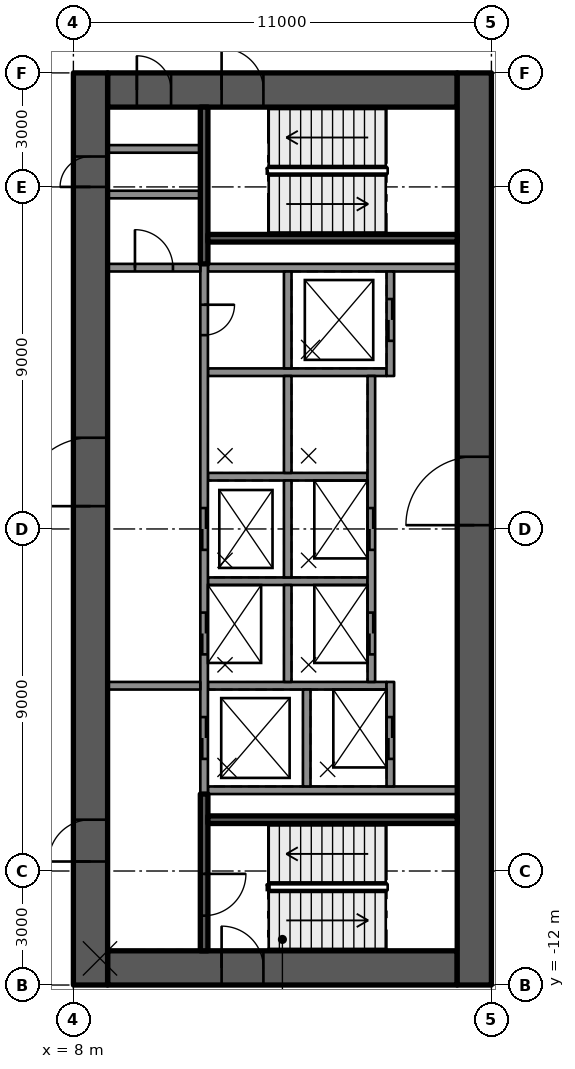
"""IFC4 building model, lengths in metres.
Left out: names, types, materials, properties, quantities, classifications, styles, units other than length and angle.
Written with IfcOpenShell. Run it as: python <this file> out.ifc"""

import sys

from ifc_helpers import new_model, si_unit, direction, frame, frame_2d, origin, place, context, subcontext, project, spatial, rectangle, extrude, element, fill, save


model = new_model("IFC4")
c1 = context("Model", 3, precision=1e-05, world=origin(), true_north=direction((0.0, 1.0)))
c2 = subcontext(c1, "Body", "Model", "MODEL_VIEW")
j1 = project(units=[si_unit("LENGTHUNIT", "METRE"), si_unit("PLANEANGLEUNIT", "RADIAN")], contexts=[c1])
p1 = place(None, origin())
s1 = spatial("IfcSite", under=j1, at=p1, CompositionType="ELEMENT")
p2 = place(p1, origin())
s2 = spatial("IfcBuilding", under=s1, at=p2, CompositionType="ELEMENT")
p3 = place(p2, frame((0.0, 0.0, 98.2)))
s3 = spatial("IfcBuildingStorey", under=s2, at=p3, CompositionType="ELEMENT", Elevation=98.2)
p4 = place(p3, frame((8.9, 11.55, 0.0), z_axis=(0.0, 0.0, 1.0), x_axis=(1.0, 0.0, 0.0)))
e1 = element("IfcWall", 1, at=p4, inside=s3, PredefinedType="SHEAR", context=c2, shape_type="SweptSolid", body=[
    extrude(rectangle(XDim=9.2, YDim=0.9, at=frame_2d((4.6, 0.0))), origin(), (0.0, 0.0, 1.0), 4.0),
])
p5 = place(p4, frame((3.0, 0.0, 0.0)))
e2 = element("IfcOpeningElement", 2, at=p5, cuts=e1, PredefinedType="OPENING", context=c2, shape_type="SweptSolid", body=[
    extrude(rectangle(XDim=1.1, YDim=2.1, at=frame_2d((0.55, 1.05))), frame((0.0, 0.46, 0.0), z_axis=(0.0, -1.0, 0.0), x_axis=(1.0, 0.0, 0.0)), (0.0, 0.0, 1.0), 0.92),
])
p6 = place(p4, frame((0.77, 0.0, 0.0)))
e3 = element("IfcOpeningElement", 3, at=p6, cuts=e1, PredefinedType="OPENING", context=c2, shape_type="SweptSolid", body=[
    extrude(rectangle(XDim=0.9, YDim=2.1, at=frame_2d((0.45, 1.05))), frame((0.0, 0.46, 0.0), z_axis=(0.0, -1.0, 0.0), x_axis=(1.0, 0.0, 0.0)), (0.0, 0.0, 1.0), 0.92),
])
p7 = place(p3, frame((8.9, -11.55, 0.0), z_axis=(0.0, 0.0, 1.0), x_axis=(1.0, 0.0, 0.0)))
e4 = element("IfcWall", 4, at=p7, inside=s3, PredefinedType="SHEAR", context=c2, shape_type="SweptSolid", body=[
    extrude(rectangle(XDim=9.2, YDim=0.9, at=frame_2d((4.6, 0.0))), origin(), (0.0, 0.0, 1.0), 4.0),
])
p8 = place(p7, frame((3.0, 0.0, 0.0)))
e5 = element("IfcOpeningElement", 5, at=p8, cuts=e4, PredefinedType="OPENING", context=c2, shape_type="SweptSolid", body=[
    extrude(rectangle(XDim=1.1, YDim=2.1, at=frame_2d((0.55, 1.05))), frame((0.0, 0.46, 0.0), z_axis=(0.0, -1.0, 0.0), x_axis=(1.0, 0.0, 0.0)), (0.0, 0.0, 1.0), 0.92),
])
p9 = place(p3, frame((8.45, -12.0, 0.0), z_axis=(0.0, 0.0, 1.0), x_axis=(0.0, 1.0, 0.0)))
e6 = element("IfcWall", 6, at=p9, inside=s3, PredefinedType="SHEAR", context=c2, shape_type="SweptSolid", body=[
    extrude(rectangle(XDim=24.0, YDim=0.9, at=frame_2d((12.0, 0.0))), origin(), (0.0, 0.0, 1.0), 4.0),
])
p10 = place(p9, frame((12.6, 0.0, 0.0)))
e7 = element("IfcOpeningElement", 7, at=p10, cuts=e6, PredefinedType="OPENING", context=c2, shape_type="SweptSolid", body=[
    extrude(rectangle(XDim=1.8, YDim=2.1, at=frame_2d((0.9, 1.05))), frame((0.0, 0.46, 0.0), z_axis=(0.0, -1.0, 0.0), x_axis=(1.0, 0.0, 0.0)), (0.0, 0.0, 1.0), 0.92),
])
p11 = place(p9, frame((3.25, 0.0, 0.0)))
e8 = element("IfcOpeningElement", 8, at=p11, cuts=e6, PredefinedType="OPENING", context=c2, shape_type="SweptSolid", body=[
    extrude(rectangle(XDim=1.1, YDim=2.1, at=frame_2d((0.55, 1.05))), frame((0.0, 0.46, 0.0), z_axis=(0.0, -1.0, 0.0), x_axis=(1.0, 0.0, 0.0)), (0.0, 0.0, 1.0), 0.92),
])
p12 = place(p9, frame((21.0, 0.0, 0.0)))
e9 = element("IfcOpeningElement", 9, at=p12, cuts=e6, PredefinedType="OPENING", context=c2, shape_type="SweptSolid", body=[
    extrude(rectangle(XDim=0.8, YDim=2.1, at=frame_2d((0.4, 1.05))), frame((0.0, 0.46, 0.0), z_axis=(0.0, -1.0, 0.0), x_axis=(1.0, 0.0, 0.0)), (0.0, 0.0, 1.0), 0.92),
])
p13 = place(p3, frame((18.55, -12.0, 0.0), z_axis=(0.0, 0.0, 1.0), x_axis=(0.0, 1.0, 0.0)))
e10 = element("IfcWall", 10, at=p13, inside=s3, PredefinedType="SHEAR", context=c2, shape_type="SweptSolid", body=[
    extrude(rectangle(XDim=24.0, YDim=0.9, at=frame_2d((12.0, 0.0))), origin(), (0.0, 0.0, 1.0), 4.0),
])
p14 = place(p13, frame((12.1, 0.0, 0.0)))
e11 = element("IfcOpeningElement", 11, at=p14, cuts=e10, PredefinedType="OPENING", context=c2, shape_type="SweptSolid", body=[
    extrude(rectangle(XDim=1.8, YDim=2.1, at=frame_2d((0.9, 1.05))), frame((0.0, 0.46, 0.0), z_axis=(0.0, -1.0, 0.0), x_axis=(1.0, 0.0, 0.0)), (0.0, 0.0, 1.0), 0.92),
])
for number, where, z_axis, x_axis in (
    (12, (11.54, -6.875, 0.0), (0.0, 0.0, 1.0), (1.0, 0.0, 0.0)),
    (13, (11.54, 6.875, 0.0), (0.0, 0.0, 1.0), (1.0, 0.0, 0.0)),
):
    element("IfcWall", number, at=place(p3, frame(where, z_axis=z_axis, x_axis=x_axis)), inside=s3, PredefinedType="SOLIDWALL", context=c2, shape_type="SweptSolid", body=[
        extrude(rectangle(XDim=6.56, YDim=0.2, at=frame_2d((3.28, 0.0))), origin(), (0.0, 0.0, 1.0), 3.59),
    ])
p15 = place(p3, frame((11.54, 4.125, 0.0), z_axis=(0.0, 0.0, 1.0), x_axis=(1.0, 0.0, 0.0)))
e14 = element("IfcWall", 14, at=p15, inside=s3, PredefinedType="SOLIDWALL", context=c2, shape_type="SweptSolid", body=[
    extrude(rectangle(XDim=4.7, YDim=0.2, at=frame_2d((2.35, 0.0))), origin(), (0.0, 0.0, 1.0), 3.59),
])
for number, where, z_axis, x_axis in (
    (15, (11.54, 1.375, 0.0), (0.0, 0.0, 1.0), (1.0, 0.0, 0.0)),
    (16, (11.54, -1.375, 0.0), (0.0, 0.0, 1.0), (1.0, 0.0, 0.0)),
):
    element("IfcWall", number, at=place(p3, frame(where, z_axis=z_axis, x_axis=x_axis)), inside=s3, PredefinedType="SOLIDWALL", context=c2, shape_type="SweptSolid", body=[
        extrude(rectangle(XDim=4.2, YDim=0.2, at=frame_2d((2.1, 0.0))), origin(), (0.0, 0.0, 1.0), 3.59),
    ])
p16 = place(p3, frame((11.54, -4.125, 0.0), z_axis=(0.0, 0.0, 1.0), x_axis=(1.0, 0.0, 0.0)))
e17 = element("IfcWall", 17, at=p16, inside=s3, PredefinedType="SOLIDWALL", context=c2, shape_type="SweptSolid", body=[
    extrude(rectangle(XDim=4.7, YDim=0.2, at=frame_2d((2.35, 0.0))), origin(), (0.0, 0.0, 1.0), 3.59),
])
p17 = place(p3, frame((11.44, 6.975, 0.0), z_axis=(0.0, 0.0, 1.0), x_axis=(0.0, -1.0, 0.0)))
e18 = element("IfcWall", 18, at=p17, inside=s3, PredefinedType="SOLIDWALL", context=c2, shape_type="SweptSolid", body=[
    extrude(rectangle(XDim=13.95, YDim=0.2, at=frame_2d((6.975, 0.0))), origin(), (0.0, 0.0, 1.0), 3.59),
])
p18 = place(p17, frame((6.425, 0.0, 0.0)))
e19 = element("IfcOpeningElement", 19, at=p18, cuts=e18, PredefinedType="OPENING", context=c2, shape_type="SweptSolid", body=[
    extrude(rectangle(XDim=1.1, YDim=2.1, at=frame_2d((0.55, 1.05))), frame((0.0, 0.11, 0.0), z_axis=(0.0, -1.0, 0.0), x_axis=(1.0, 0.0, 0.0)), (0.0, 0.0, 1.0), 0.22),
])
p19 = place(p17, frame((9.175, 0.0, 0.0)))
e20 = element("IfcOpeningElement", 20, at=p19, cuts=e18, PredefinedType="OPENING", context=c2, shape_type="SweptSolid", body=[
    extrude(rectangle(XDim=1.1, YDim=2.1, at=frame_2d((0.55, 1.05))), frame((0.0, 0.11, 0.0), z_axis=(0.0, -1.0, 0.0), x_axis=(1.0, 0.0, 0.0)), (0.0, 0.0, 1.0), 0.22),
])
p20 = place(p17, frame((11.925, 0.0, 0.0)))
e21 = element("IfcOpeningElement", 21, at=p20, cuts=e18, PredefinedType="OPENING", context=c2, shape_type="SweptSolid", body=[
    extrude(rectangle(XDim=1.1, YDim=2.1, at=frame_2d((0.55, 1.05))), frame((0.0, 0.11, 0.0), z_axis=(0.0, -1.0, 0.0), x_axis=(1.0, 0.0, 0.0)), (0.0, 0.0, 1.0), 0.22),
])
p21 = place(p17, frame((1.075, 0.0, 0.0)))
e22 = element("IfcOpeningElement", 22, at=p21, cuts=e18, PredefinedType="OPENING", context=c2, shape_type="SweptSolid", body=[
    extrude(rectangle(XDim=0.8, YDim=2.1, at=frame_2d((0.4, 1.05))), frame((0.0, 0.11, 0.0), z_axis=(0.0, -1.0, 0.0), x_axis=(1.0, 0.0, 0.0)), (0.0, 0.0, 1.0), 0.22),
])
for number, where, z_axis, x_axis in (
    (23, (13.64, 6.775, 0.0), (0.0, 0.0, 1.0), (0.0, -1.0, 0.0)),
    (24, (13.64, 4.025, 0.0), (0.0, 0.0, 1.0), (0.0, -1.0, 0.0)),
    (25, (13.64, 1.275, 0.0), (0.0, 0.0, 1.0), (0.0, -1.0, 0.0)),
    (26, (13.64, -1.475, 0.0), (0.0, 0.0, 1.0), (0.0, -1.0, 0.0)),
    (27, (14.14, -4.225, 0.0), (0.0, 0.0, 1.0), (0.0, -1.0, 0.0)),
):
    element("IfcWall", number, at=place(p3, frame(where, z_axis=z_axis, x_axis=x_axis)), inside=s3, PredefinedType="SOLIDWALL", context=c2, shape_type="SweptSolid", body=[
        extrude(rectangle(XDim=2.55, YDim=0.2, at=frame_2d((1.275, 0.0))), origin(), (0.0, 0.0, 1.0), 3.59),
    ])
p22 = place(p3, frame((16.34, 6.775, 0.0), z_axis=(0.0, 0.0, 1.0), x_axis=(0.0, -1.0, 0.0)))
e28 = element("IfcWall", 28, at=p22, inside=s3, PredefinedType="SOLIDWALL", context=c2, shape_type="SweptSolid", body=[
    extrude(rectangle(XDim=2.75, YDim=0.2, at=frame_2d((1.375, 0.0))), origin(), (0.0, 0.0, 1.0), 3.59),
])
p23 = place(p22, frame((0.725, 0.0, 0.0)))
e29 = element("IfcOpeningElement", 29, at=p23, cuts=e28, PredefinedType="OPENING", context=c2, shape_type="SweptSolid", body=[
    extrude(rectangle(XDim=1.1, YDim=2.1, at=frame_2d((0.55, 1.05))), frame((0.0, 0.11, 0.0), z_axis=(0.0, -1.0, 0.0), x_axis=(1.0, 0.0, 0.0)), (0.0, 0.0, 1.0), 0.22),
])
p24 = place(p3, frame((15.84, 4.025, 0.0), z_axis=(0.0, 0.0, 1.0), x_axis=(0.0, -1.0, 0.0)))
e30 = element("IfcWall", 30, at=p24, inside=s3, PredefinedType="SOLIDWALL", context=c2, shape_type="SweptSolid", body=[
    extrude(rectangle(XDim=8.05, YDim=0.2, at=frame_2d((4.025, 0.0))), origin(), (0.0, 0.0, 1.0), 3.59),
])
p25 = place(p24, frame((3.475, 0.0, 0.0)))
e31 = element("IfcOpeningElement", 31, at=p25, cuts=e30, PredefinedType="OPENING", context=c2, shape_type="SweptSolid", body=[
    extrude(rectangle(XDim=1.1, YDim=2.1, at=frame_2d((0.55, 1.05))), frame((0.0, 0.11, 0.0), z_axis=(0.0, -1.0, 0.0), x_axis=(1.0, 0.0, 0.0)), (0.0, 0.0, 1.0), 0.22),
])
p26 = place(p24, frame((6.225, 0.0, 0.0)))
e32 = element("IfcOpeningElement", 32, at=p26, cuts=e30, PredefinedType="OPENING", context=c2, shape_type="SweptSolid", body=[
    extrude(rectangle(XDim=1.1, YDim=2.1, at=frame_2d((0.55, 1.05))), frame((0.0, 0.11, 0.0), z_axis=(0.0, -1.0, 0.0), x_axis=(1.0, 0.0, 0.0)), (0.0, 0.0, 1.0), 0.22),
])
p27 = place(p3, frame((16.34, -4.025, 0.0), z_axis=(0.0, 0.0, 1.0), x_axis=(0.0, -1.0, 0.0)))
e33 = element("IfcWall", 33, at=p27, inside=s3, PredefinedType="SOLIDWALL", context=c2, shape_type="SweptSolid", body=[
    extrude(rectangle(XDim=2.75, YDim=0.2, at=frame_2d((1.375, 0.0))), origin(), (0.0, 0.0, 1.0), 3.59),
])
p28 = place(p27, frame((0.925, 0.0, 0.0)))
e34 = element("IfcOpeningElement", 34, at=p28, cuts=e33, PredefinedType="OPENING", context=c2, shape_type="SweptSolid", body=[
    extrude(rectangle(XDim=1.1, YDim=2.1, at=frame_2d((0.55, 1.05))), frame((0.0, 0.11, 0.0), z_axis=(0.0, -1.0, 0.0), x_axis=(1.0, 0.0, 0.0)), (0.0, 0.0, 1.0), 0.22),
])
p29 = place(p3, frame((11.44, -6.975, 0.0), z_axis=(0.0, 0.0, 1.0), x_axis=(0.0, -1.0, 0.0)))
e35 = element("IfcWall", 35, at=p29, inside=s3, PredefinedType="SOLIDWALL", context=c2, shape_type="SweptSolid", body=[
    extrude(rectangle(XDim=4.125, YDim=0.2, at=frame_2d((2.062, 0.0))), origin(), (0.0, 0.0, 1.0), 3.59),
])
p30 = place(p29, frame((2.1, 0.0, 0.0)))
e36 = element("IfcOpeningElement", 36, at=p30, cuts=e35, PredefinedType="OPENING", context=c2, shape_type="SweptSolid", body=[
    extrude(rectangle(XDim=1.1, YDim=2.1, at=frame_2d((0.55, 1.05))), frame((0.0, 0.11, 0.0), z_axis=(0.0, -1.0, 0.0), x_axis=(1.0, 0.0, 0.0)), (0.0, 0.0, 1.0), 0.22),
])
p31 = place(p3, frame((11.54, -7.65, 0.0), z_axis=(0.0, 0.0, 1.0), x_axis=(1.0, 0.0, 0.0)))
e37 = element("IfcWall", 37, at=p31, inside=s3, PredefinedType="SOLIDWALL", context=c2, shape_type="SweptSolid", body=[
    extrude(rectangle(XDim=6.56, YDim=0.2, at=frame_2d((3.28, 0.0))), origin(), (0.0, 0.0, 1.0), 3.59),
])
p32 = place(p3, frame((11.44, 11.1, 0.0), z_axis=(0.0, 0.0, 1.0), x_axis=(0.0, -1.0, 0.0)))
e38 = element("IfcWall", 38, at=p32, inside=s3, PredefinedType="SOLIDWALL", context=c2, shape_type="SweptSolid", body=[
    extrude(rectangle(XDim=4.125, YDim=0.2, at=frame_2d((2.062, 0.0))), origin(), (0.0, 0.0, 1.0), 3.59),
])
p33 = place(p3, frame((11.54, 7.65, 0.0), z_axis=(0.0, 0.0, 1.0), x_axis=(1.0, 0.0, 0.0)))
e39 = element("IfcWall", 39, at=p33, inside=s3, PredefinedType="SOLIDWALL", context=c2, shape_type="SweptSolid", body=[
    extrude(rectangle(XDim=6.56, YDim=0.2, at=frame_2d((3.28, 0.0))), origin(), (0.0, 0.0, 1.0), 3.59),
])
p34 = place(p3, frame((8.9, -4.125, 0.0), z_axis=(0.0, 0.0, 1.0), x_axis=(1.0, 0.0, 0.0)))
e40 = element("IfcWall", 40, at=p34, inside=s3, PredefinedType="PARTITIONING", context=c2, shape_type="SweptSolid", body=[
    extrude(rectangle(XDim=2.44, YDim=0.2, at=frame_2d((1.22, 0.0))), origin(), (0.0, 0.0, 1.0), 3.59),
])
p35 = place(p3, frame((8.9, 6.875, 0.0), z_axis=(0.0, 0.0, 1.0), x_axis=(1.0, 0.0, 0.0)))
e41 = element("IfcWall", 41, at=p35, inside=s3, PredefinedType="PARTITIONING", context=c2, shape_type="SweptSolid", body=[
    extrude(rectangle(XDim=2.44, YDim=0.2, at=frame_2d((1.22, 0.0))), origin(), (0.0, 0.0, 1.0), 3.59),
])
p36 = place(p35, frame((0.72, 0.0, 0.0)))
e42 = element("IfcOpeningElement", 42, at=p36, cuts=e41, PredefinedType="OPENING", context=c2, shape_type="SweptSolid", body=[
    extrude(rectangle(XDim=1.0, YDim=2.1, at=frame_2d((0.5, 1.05))), frame((0.0, 0.11, 0.0), z_axis=(0.0, -1.0, 0.0), x_axis=(1.0, 0.0, 0.0)), (0.0, 0.0, 1.0), 0.22),
])
for number, where, z_axis, x_axis in (
    (43, (8.9, 10.0, 0.0), (0.0, 0.0, 1.0), (1.0, 0.0, 0.0)),
    (44, (8.9, 8.8, 0.0), (0.0, 0.0, 1.0), (1.0, 0.0, 0.0)),
):
    element("IfcWall", number, at=place(p3, frame(where, z_axis=z_axis, x_axis=x_axis)), inside=s3, PredefinedType="PARTITIONING", context=c2, shape_type="SweptSolid", body=[
        extrude(rectangle(XDim=2.44, YDim=0.2, at=frame_2d((1.22, 0.0))), origin(), (0.0, 0.0, 1.0), 3.59),
    ])
p37 = place(p23, origin())
e45 = element("IfcDoor", 45, at=p37, inside=s3, OperationType="DOUBLE_DOOR_SLIDING", PredefinedType="DOOR", context=c2, shape_type="SweptSolid", body=[
    extrude(rectangle(XDim=1.1, YDim=2.1, at=frame_2d((0.55, 1.05))), frame((0.0, 0.025, 0.0), z_axis=(0.0, -1.0, 0.0), x_axis=(1.0, 0.0, 0.0)), (0.0, 0.0, 1.0), 0.05),
])
fill(e29, e45)
p38 = place(p18, origin())
e46 = element("IfcDoor", 46, at=p38, inside=s3, OperationType="DOUBLE_DOOR_SLIDING", PredefinedType="DOOR", context=c2, shape_type="SweptSolid", body=[
    extrude(rectangle(XDim=1.1, YDim=2.1, at=frame_2d((0.55, 1.05))), frame((0.0, 0.025, 0.0), z_axis=(0.0, -1.0, 0.0), x_axis=(1.0, 0.0, 0.0)), (0.0, 0.0, 1.0), 0.05),
])
fill(e19, e46)
p39 = place(p25, origin())
e47 = element("IfcDoor", 47, at=p39, inside=s3, OperationType="DOUBLE_DOOR_SLIDING", PredefinedType="DOOR", context=c2, shape_type="SweptSolid", body=[
    extrude(rectangle(XDim=1.1, YDim=2.1, at=frame_2d((0.55, 1.05))), frame((0.0, 0.025, 0.0), z_axis=(0.0, -1.0, 0.0), x_axis=(1.0, 0.0, 0.0)), (0.0, 0.0, 1.0), 0.05),
])
fill(e31, e47)
p40 = place(p19, origin())
e48 = element("IfcDoor", 48, at=p40, inside=s3, OperationType="DOUBLE_DOOR_SLIDING", PredefinedType="DOOR", context=c2, shape_type="SweptSolid", body=[
    extrude(rectangle(XDim=1.1, YDim=2.1, at=frame_2d((0.55, 1.05))), frame((0.0, 0.025, 0.0), z_axis=(0.0, -1.0, 0.0), x_axis=(1.0, 0.0, 0.0)), (0.0, 0.0, 1.0), 0.05),
])
fill(e20, e48)
p41 = place(p26, origin())
e49 = element("IfcDoor", 49, at=p41, inside=s3, OperationType="DOUBLE_DOOR_SLIDING", PredefinedType="DOOR", context=c2, shape_type="SweptSolid", body=[
    extrude(rectangle(XDim=1.1, YDim=2.1, at=frame_2d((0.55, 1.05))), frame((0.0, 0.025, 0.0), z_axis=(0.0, -1.0, 0.0), x_axis=(1.0, 0.0, 0.0)), (0.0, 0.0, 1.0), 0.05),
])
fill(e32, e49)
p42 = place(p20, origin())
e50 = element("IfcDoor", 50, at=p42, inside=s3, OperationType="DOUBLE_DOOR_SLIDING", PredefinedType="DOOR", context=c2, shape_type="SweptSolid", body=[
    extrude(rectangle(XDim=1.1, YDim=2.1, at=frame_2d((0.55, 1.05))), frame((0.0, 0.025, 0.0), z_axis=(0.0, -1.0, 0.0), x_axis=(1.0, 0.0, 0.0)), (0.0, 0.0, 1.0), 0.05),
])
fill(e21, e50)
p43 = place(p28, origin())
e51 = element("IfcDoor", 51, at=p43, inside=s3, OperationType="DOUBLE_DOOR_SLIDING", PredefinedType="DOOR", context=c2, shape_type="SweptSolid", body=[
    extrude(rectangle(XDim=1.1, YDim=2.1, at=frame_2d((0.55, 1.05))), frame((0.0, 0.025, 0.0), z_axis=(0.0, -1.0, 0.0), x_axis=(1.0, 0.0, 0.0)), (0.0, 0.0, 1.0), 0.05),
])
fill(e34, e51)
p44 = place(p21, origin())
e52 = element("IfcDoor", 52, at=p44, inside=s3, OperationType="SINGLE_SWING_LEFT", PredefinedType="DOOR", context=c2, shape_type="SweptSolid", body=[
    extrude(rectangle(XDim=0.8, YDim=2.1, at=frame_2d((0.4, 1.05))), frame((0.0, 0.025, 0.0), z_axis=(0.0, -1.0, 0.0), x_axis=(1.0, 0.0, 0.0)), (0.0, 0.0, 1.0), 0.05),
])
fill(e22, e52)
p45 = place(p10, origin())
e53 = element("IfcDoor", 53, at=p45, inside=s3, OperationType="SINGLE_SWING_RIGHT", PredefinedType="DOOR", context=c2, shape_type="SweptSolid", body=[
    extrude(rectangle(XDim=1.8, YDim=2.1, at=frame_2d((0.9, 1.05))), frame((0.0, 0.025, 0.0), z_axis=(0.0, -1.0, 0.0), x_axis=(1.0, 0.0, 0.0)), (0.0, 0.0, 1.0), 0.05),
])
fill(e7, e53)
p46 = place(p14, origin())
e54 = element("IfcDoor", 54, at=p46, inside=s3, OperationType="SINGLE_SWING_RIGHT", PredefinedType="DOOR", context=c2, shape_type="SweptSolid", body=[
    extrude(rectangle(XDim=1.8, YDim=2.1, at=frame_2d((0.9, 1.05))), frame((0.0, 0.025, 0.0), z_axis=(0.0, -1.0, 0.0), x_axis=(1.0, 0.0, 0.0)), (0.0, 0.0, 1.0), 0.05),
])
fill(e11, e54)
p47 = place(p11, origin())
e55 = element("IfcDoor", 55, at=p47, inside=s3, OperationType="SINGLE_SWING_LEFT", PredefinedType="DOOR", context=c2, shape_type="SweptSolid", body=[
    extrude(rectangle(XDim=1.1, YDim=2.1, at=frame_2d((0.55, 1.05))), frame((0.0, 0.025, 0.0), z_axis=(0.0, -1.0, 0.0), x_axis=(1.0, 0.0, 0.0)), (0.0, 0.0, 1.0), 0.05),
])
fill(e8, e55)
p48 = place(p8, origin())
e56 = element("IfcDoor", 56, at=p48, inside=s3, OperationType="SINGLE_SWING_LEFT", PredefinedType="DOOR", context=c2, shape_type="SweptSolid", body=[
    extrude(rectangle(XDim=1.1, YDim=2.1, at=frame_2d((0.55, 1.05))), frame((0.0, 0.025, 0.0), z_axis=(0.0, -1.0, 0.0), x_axis=(1.0, 0.0, 0.0)), (0.0, 0.0, 1.0), 0.05),
])
fill(e5, e56)
p49 = place(p5, origin())
e57 = element("IfcDoor", 57, at=p49, inside=s3, OperationType="SINGLE_SWING_LEFT", PredefinedType="DOOR", context=c2, shape_type="SweptSolid", body=[
    extrude(rectangle(XDim=1.1, YDim=2.1, at=frame_2d((0.55, 1.05))), frame((0.0, 0.025, 0.0), z_axis=(0.0, -1.0, 0.0), x_axis=(1.0, 0.0, 0.0)), (0.0, 0.0, 1.0), 0.05),
])
fill(e2, e57)
p50 = place(p30, origin())
e58 = element("IfcDoor", 58, at=p50, inside=s3, OperationType="SINGLE_SWING_RIGHT", PredefinedType="DOOR", context=c2, shape_type="SweptSolid", body=[
    extrude(rectangle(XDim=1.1, YDim=2.1, at=frame_2d((0.55, 1.05))), frame((0.0, 0.025, 0.0), z_axis=(0.0, -1.0, 0.0), x_axis=(1.0, 0.0, 0.0)), (0.0, 0.0, 1.0), 0.05),
])
fill(e36, e58)
p51 = place(p6, origin())
e59 = element("IfcDoor", 59, at=p51, inside=s3, OperationType="SINGLE_SWING_LEFT", PredefinedType="DOOR", context=c2, shape_type="SweptSolid", body=[
    extrude(rectangle(XDim=0.9, YDim=2.1, at=frame_2d((0.45, 1.05))), frame((0.0, 0.025, 0.0), z_axis=(0.0, -1.0, 0.0), x_axis=(1.0, 0.0, 0.0)), (0.0, 0.0, 1.0), 0.05),
])
fill(e3, e59)
p52 = place(p12, origin())
e60 = element("IfcDoor", 60, at=p52, inside=s3, OperationType="SINGLE_SWING_RIGHT", PredefinedType="DOOR", context=c2, shape_type="SweptSolid", body=[
    extrude(rectangle(XDim=0.8, YDim=2.1, at=frame_2d((0.4, 1.05))), frame((0.0, 0.025, 0.0), z_axis=(0.0, -1.0, 0.0), x_axis=(1.0, 0.0, 0.0)), (0.0, 0.0, 1.0), 0.05),
])
fill(e9, e60)
p53 = place(p36, origin())
e61 = element("IfcDoor", 61, at=p53, inside=s3, OperationType="SINGLE_SWING_RIGHT", PredefinedType="DOOR", context=c2, shape_type="SweptSolid", body=[
    extrude(rectangle(XDim=1.0, YDim=2.1, at=frame_2d((0.5, 1.05))), frame((0.0, 0.025, 0.0), z_axis=(0.0, -1.0, 0.0), x_axis=(1.0, 0.0, 0.0)), (0.0, 0.0, 1.0), 0.05),
])
fill(e42, e61)
save(model, sys.argv[1])
